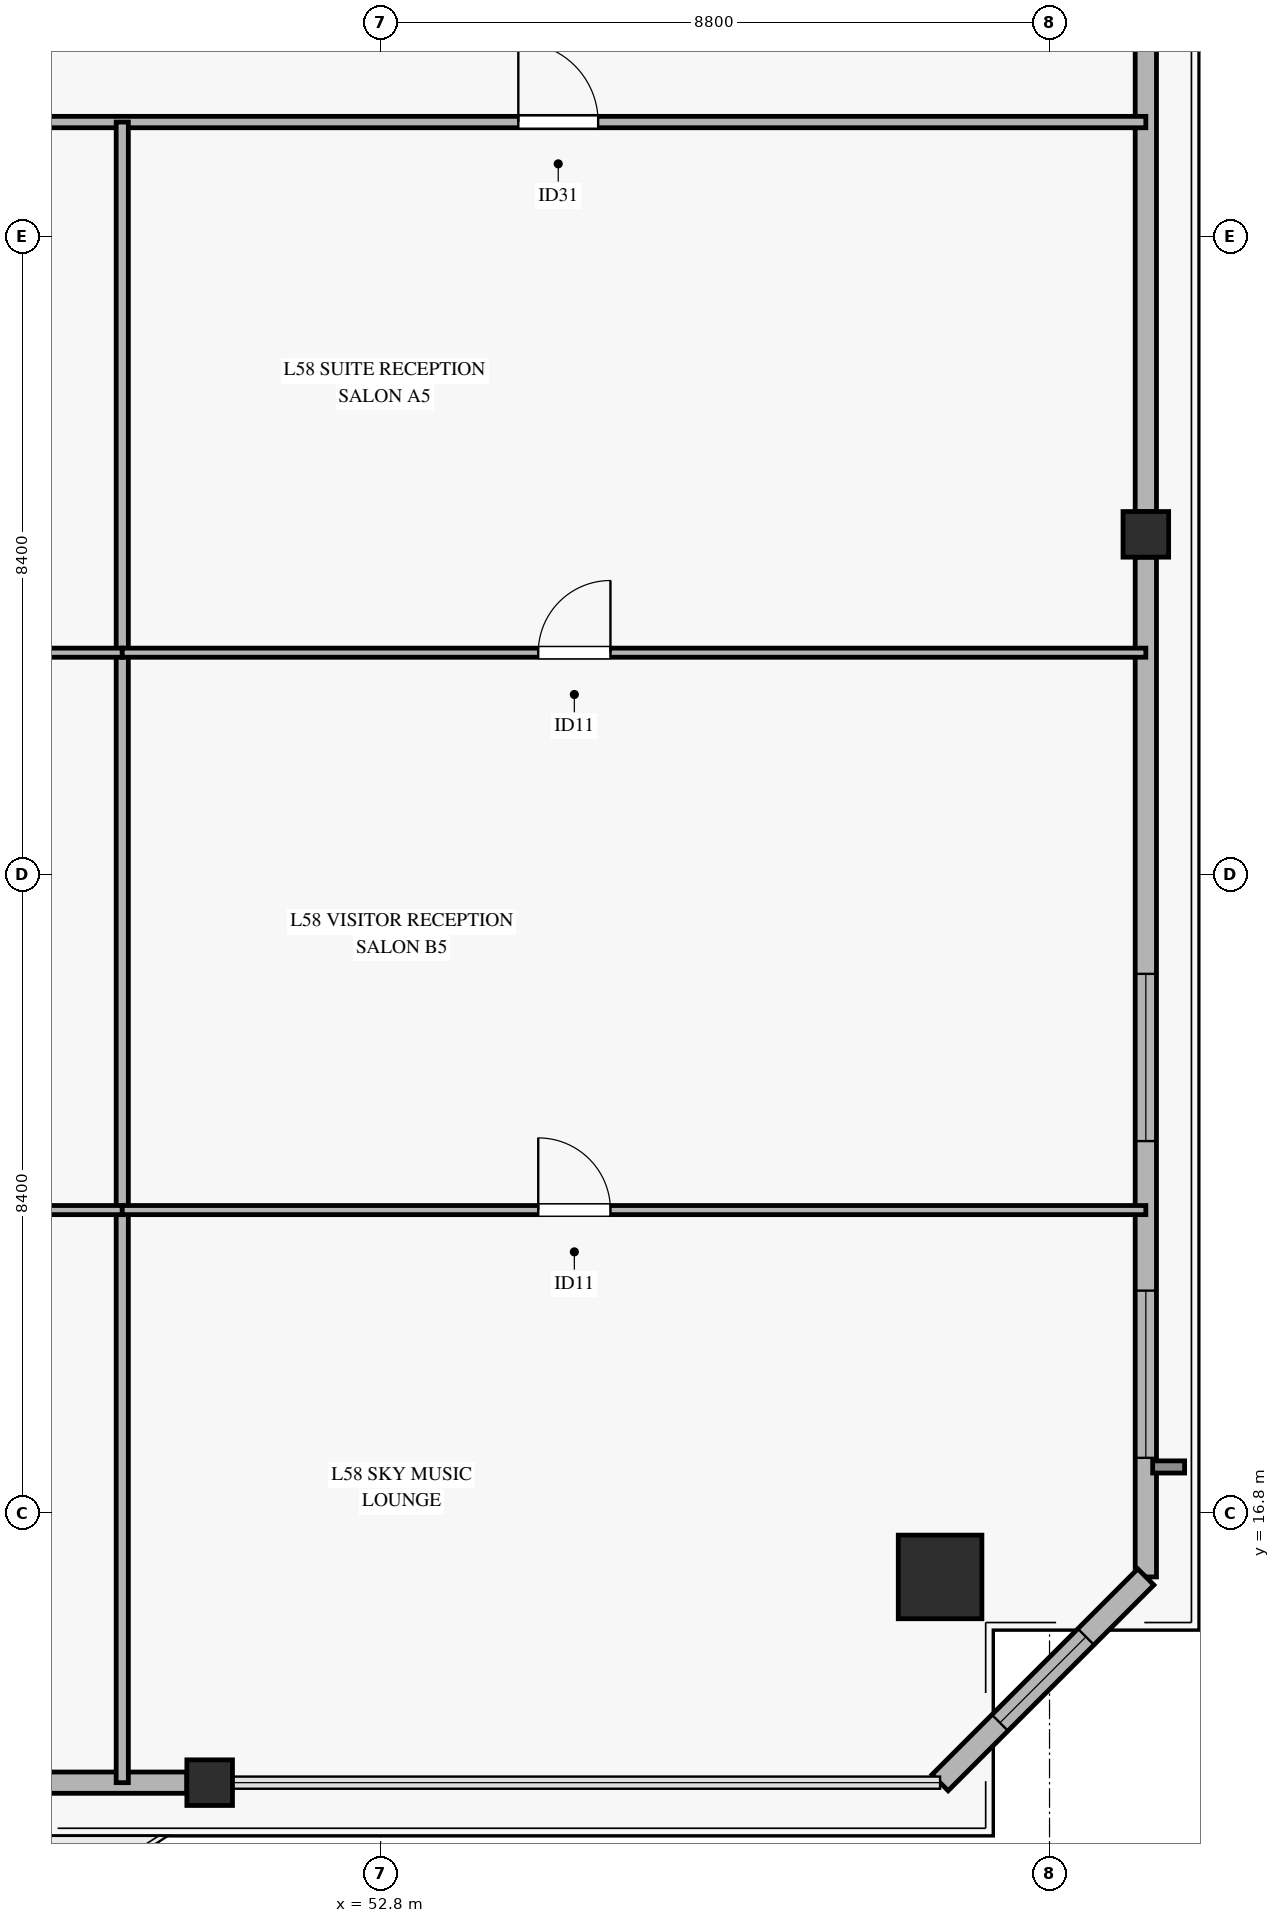
"""IFC4 building model, lengths in metres.
Left out: names, types, materials, properties, quantities, classifications, styles, units other than length and angle.
Written with IfcOpenShell. Run it as: python <this file> out.ifc"""

import sys

from ifc_helpers import new_model, si_unit, direction, frame, frame_2d, origin, origin_2d, place, context, subcontext, project, spatial, rectangle, hollow_rectangle, extrude, source, transform, mapped, element, fill, save


model = new_model("IFC4")
c1 = context("Model", 3, precision=1e-05, world=origin(), true_north=direction((0.0, 1.0)))
c2 = subcontext(c1, "Body", "Model", "MODEL_VIEW")
j1 = project(units=[si_unit("LENGTHUNIT", "METRE"), si_unit("PLANEANGLEUNIT", "RADIAN")], contexts=[c1])
p1 = place(None, origin())
s1 = spatial("IfcSite", under=j1, at=p1, CompositionType="ELEMENT")
p2 = place(p1, origin())
s2 = spatial("IfcBuilding", under=s1, at=p2, CompositionType="ELEMENT")
p3 = place(p2, frame((0.0, 0.0, 230.4)))
s3 = spatial("IfcBuildingStorey", under=s2, at=p3, CompositionType="ELEMENT", Elevation=230.4)
m1 = source(origin(), c2, "Body", "SweptSolid", [
    extrude(hollow_rectangle(XDim=1.1, YDim=1.1, WallThickness=0.05, at=origin_2d()), origin(), (0.0, 0.0, 1.0), 3.185),
])
p4 = place(p3, frame((60.16, 15.957, 0.0), z_axis=(0.0, 0.0, 1.0), x_axis=(1.0, 0.0, 0.0)))
e1 = element("IfcColumn", 1, at=p4, inside=s3, PredefinedType="COLUMN", context=c2, shape_type="MappedRepresentation", body=[
    mapped(m1, transform((0.0, 0.0, 0.0), x_axis=(1.0, 0.0, 0.0), y_axis=(0.0, 1.0, 0.0), z_axis=(0.0, 0.0, 1.0), scale=1.0)),
])
m2 = source(origin(), c2, "Body", "SweptSolid", [
    extrude(hollow_rectangle(XDim=0.6, YDim=0.6, WallThickness=0.028, at=origin_2d()), origin(), (0.0, 0.0, 1.0), 3.185),
])
for number, where, z_axis, x_axis in (
    (2, (50.55, 13.25, 0.0), (0.0, 0.0, 1.0), (1.0, 0.0, 0.0)),
    (3, (62.867, 29.675, 0.0), (0.0, 0.0, 1.0), (1.0, 0.0, 0.0)),
):
    element("IfcColumn", number, at=place(p3, frame(where, z_axis=z_axis, x_axis=x_axis)), inside=s3, PredefinedType="COLUMN", context=c2, shape_type="MappedRepresentation", body=[
        mapped(m2, transform((0.0, 0.0, 0.0), x_axis=(1.0, 0.0, 0.0), y_axis=(0.0, 1.0, 0.0), z_axis=(0.0, 0.0, 1.0), scale=1.0)),
    ])
p5 = place(p3, frame((44.6, 13.25, 0.0), z_axis=(0.0, 0.0, 1.0), x_axis=(1.0, 0.0, 0.0)))
e4 = element("IfcWall", 4, at=p5, inside=s3, PredefinedType="SOLIDWALL", context=c2, shape_type="SweptSolid", body=[
    extrude(rectangle(XDim=5.65, YDim=0.28, at=frame_2d((2.825, 0.0))), origin(), (0.0, 0.0, 1.0), 2.815),
])
p6 = place(p5, frame((1.9, 0.0, 0.0)))
e5 = element("IfcOpeningElement", 5, at=p6, cuts=e4, PredefinedType="OPENING", context=c2, shape_type="SweptSolid", body=[
    extrude(rectangle(XDim=1.8, YDim=2.25, at=frame_2d((0.9, 1.125))), frame((0.0, 0.15, 0.0), z_axis=(0.0, -1.0, 0.0), x_axis=(1.0, 0.0, 0.0)), (0.0, 0.0, 1.0), 0.3),
])
p7 = place(p3, frame((62.867, 15.957, 0.0), z_axis=(0.0, 0.0, 1.0), x_axis=(0.0, 1.0, 0.0)))
e6 = element("IfcWall", 6, at=p7, inside=s3, PredefinedType="SOLIDWALL", context=c2, shape_type="SweptSolid", body=[
    extrude(rectangle(XDim=13.418, YDim=0.28, at=frame_2d((6.709, 0.0))), origin(), (0.0, 0.0, 1.0), 2.815),
])
p8 = place(p7, frame((1.567, 0.0, 0.45)))
e7 = element("IfcOpeningElement", 7, at=p8, cuts=e6, PredefinedType="OPENING", context=c2, shape_type="SweptSolid", body=[
    extrude(rectangle(XDim=2.2, YDim=2.1, at=frame_2d((1.1, 1.05))), frame((0.0, 0.15, 0.0), z_axis=(0.0, -1.0, 0.0), x_axis=(1.0, 0.0, 0.0)), (0.0, 0.0, 1.0), 0.3),
])
p9 = place(p7, frame((5.735, 0.0, 0.45)))
e8 = element("IfcOpeningElement", 8, at=p9, cuts=e6, PredefinedType="OPENING", context=c2, shape_type="SweptSolid", body=[
    extrude(rectangle(XDim=2.2, YDim=2.1, at=frame_2d((1.1, 1.05))), frame((0.0, 0.15, 0.0), z_axis=(0.0, -1.0, 0.0), x_axis=(1.0, 0.0, 0.0)), (0.0, 0.0, 1.0), 0.3),
])
p10 = place(p3, frame((62.867, 29.975, 0.0), z_axis=(0.0, 0.0, 1.0), x_axis=(0.0, 1.0, 0.0)))
e9 = element("IfcWall", 9, at=p10, inside=s3, PredefinedType="SOLIDWALL", context=c2, shape_type="SweptSolid", body=[
    extrude(rectangle(XDim=13.418, YDim=0.28, at=frame_2d((6.709, 0.0))), origin(), (0.0, 0.0, 1.0), 2.815),
])
p11 = place(p10, frame((8.093, 0.0, 0.45)))
e10 = element("IfcOpeningElement", 10, at=p11, cuts=e9, PredefinedType="OPENING", context=c2, shape_type="SweptSolid", body=[
    extrude(rectangle(XDim=2.2, YDim=2.1, at=frame_2d((1.1, 1.05))), frame((0.0, 0.15, 0.0), z_axis=(0.0, -1.0, 0.0), x_axis=(1.0, 0.0, 0.0)), (0.0, 0.0, 1.0), 0.3),
])
p12 = place(p3, frame((60.16, 13.25, 0.0), z_axis=(0.0, 0.0, 1.0), x_axis=(0.707106781187, 0.707106781187, 0.0)))
e11 = element("IfcWall", 11, at=p12, inside=s3, PredefinedType="SOLIDWALL", context=c2, shape_type="SweptSolid", body=[
    extrude(rectangle(XDim=3.828, YDim=0.3, at=frame_2d((1.914, 0.0))), origin(), (0.0, 0.0, 1.0), 2.815),
])
p13 = place(p12, frame((1.114, 0.0, 0.45)))
e12 = element("IfcOpeningElement", 12, at=p13, cuts=e11, PredefinedType="OPENING", context=c2, shape_type="SweptSolid", body=[
    extrude(rectangle(XDim=1.6, YDim=2.0, at=frame_2d((0.8, 1.0))), frame((0.0, 0.16, 0.0), z_axis=(0.0, -1.0, 0.0), x_axis=(1.0, 0.0, 0.0)), (0.0, 0.0, 1.0), 0.32),
])
p14 = place(p3, frame((7.533, 35.1, 0.0), z_axis=(0.0, 0.0, 1.0), x_axis=(1.0, 0.0, 0.0)))
e13 = element("IfcWall", 13, at=p14, inside=s3, PredefinedType="PARTITIONING", context=c2, shape_type="SweptSolid", body=[
    extrude(rectangle(XDim=55.334, YDim=0.15, at=frame_2d((27.667, 0.0))), origin(), (0.0, 0.0, 1.0), 2.37),
])
p15 = place(p14, frame((5.335, 0.0, 0.0)))
e14 = element("IfcOpeningElement", 14, at=p15, cuts=e13, PredefinedType="OPENING", context=c2, shape_type="SweptSolid", body=[
    extrude(rectangle(XDim=1.05, YDim=2.15, at=frame_2d((0.525, 1.075))), frame((0.0, 0.085, 0.0), z_axis=(0.0, -1.0, 0.0), x_axis=(1.0, 0.0, 0.0)), (0.0, 0.0, 1.0), 0.17),
])
p16 = place(p14, frame((17.207, 0.0, 0.0)))
e15 = element("IfcOpeningElement", 15, at=p16, cuts=e13, PredefinedType="OPENING", context=c2, shape_type="SweptSolid", body=[
    extrude(rectangle(XDim=1.05, YDim=2.15, at=frame_2d((0.525, 1.075))), frame((0.0, 0.085, 0.0), z_axis=(0.0, -1.0, 0.0), x_axis=(1.0, 0.0, 0.0)), (0.0, 0.0, 1.0), 0.17),
])
p17 = place(p14, frame((25.884, 0.0, 0.0)))
e16 = element("IfcOpeningElement", 16, at=p17, cuts=e13, PredefinedType="OPENING", context=c2, shape_type="SweptSolid", body=[
    extrude(rectangle(XDim=1.05, YDim=2.15, at=frame_2d((0.525, 1.075))), frame((0.0, 0.085, 0.0), z_axis=(0.0, -1.0, 0.0), x_axis=(1.0, 0.0, 0.0)), (0.0, 0.0, 1.0), 0.17),
])
p18 = place(p14, frame((35.712, 0.0, 0.0)))
e17 = element("IfcOpeningElement", 17, at=p18, cuts=e13, PredefinedType="OPENING", context=c2, shape_type="SweptSolid", body=[
    extrude(rectangle(XDim=1.05, YDim=2.15, at=frame_2d((0.525, 1.075))), frame((0.0, 0.085, 0.0), z_axis=(0.0, -1.0, 0.0), x_axis=(1.0, 0.0, 0.0)), (0.0, 0.0, 1.0), 0.17),
])
p19 = place(p14, frame((47.078, 0.0, 0.0)))
e18 = element("IfcOpeningElement", 18, at=p19, cuts=e13, PredefinedType="OPENING", context=c2, shape_type="SweptSolid", body=[
    extrude(rectangle(XDim=1.05, YDim=2.15, at=frame_2d((0.525, 1.075))), frame((0.0, 0.085, 0.0), z_axis=(0.0, -1.0, 0.0), x_axis=(1.0, 0.0, 0.0)), (0.0, 0.0, 1.0), 0.17),
])
p20 = place(p3, frame((49.4, 13.25, 0.0), z_axis=(0.0, 0.0, 1.0), x_axis=(0.0, 1.0, 0.0)))
e19 = element("IfcWall", 19, at=p20, inside=s3, PredefinedType="PARTITIONING", context=c2, shape_type="SweptSolid", body=[
    extrude(rectangle(XDim=21.85, YDim=0.16, at=frame_2d((10.925, 0.0))), origin(), (0.0, 0.0, 1.0), 2.77),
])
p21 = place(p3, frame((39.2, 20.784, 0.0), z_axis=(0.0, 0.0, 1.0), x_axis=(1.0, 0.0, 0.0)))
e20 = element("IfcWall", 20, at=p21, inside=s3, PredefinedType="PARTITIONING", context=c2, shape_type="SweptSolid", body=[
    extrude(rectangle(XDim=10.2, YDim=0.12, at=frame_2d((5.1, 0.0))), origin(), (0.0, 0.0, 1.0), 2.37),
])
p22 = place(p21, frame((4.246, 0.0, 0.0)))
e21 = element("IfcOpeningElement", 21, at=p22, cuts=e20, PredefinedType="OPENING", context=c2, shape_type="SweptSolid", body=[
    extrude(rectangle(XDim=0.95, YDim=2.1, at=frame_2d((0.475, 1.05))), frame((0.0, 0.07, 0.0), z_axis=(0.0, -1.0, 0.0), x_axis=(1.0, 0.0, 0.0)), (0.0, 0.0, 1.0), 0.14),
])
p23 = place(p3, frame((39.2, 28.118, 0.0), z_axis=(0.0, 0.0, 1.0), x_axis=(1.0, 0.0, 0.0)))
e22 = element("IfcWall", 22, at=p23, inside=s3, PredefinedType="PARTITIONING", context=c2, shape_type="SweptSolid", body=[
    extrude(rectangle(XDim=10.2, YDim=0.12, at=frame_2d((5.1, 0.0))), origin(), (0.0, 0.0, 1.0), 2.37),
])
p24 = place(p23, frame((4.246, 0.0, 0.0)))
e23 = element("IfcOpeningElement", 23, at=p24, cuts=e22, PredefinedType="OPENING", context=c2, shape_type="SweptSolid", body=[
    extrude(rectangle(XDim=0.95, YDim=2.1, at=frame_2d((0.475, 1.05))), frame((0.0, 0.07, 0.0), z_axis=(0.0, -1.0, 0.0), x_axis=(1.0, 0.0, 0.0)), (0.0, 0.0, 1.0), 0.14),
])
p25 = place(p3, frame((49.4, 20.784, 0.0), z_axis=(0.0, 0.0, 1.0), x_axis=(1.0, 0.0, 0.0)))
e24 = element("IfcWall", 24, at=p25, inside=s3, PredefinedType="PARTITIONING", context=c2, shape_type="SweptSolid", body=[
    extrude(rectangle(XDim=13.467, YDim=0.12, at=frame_2d((6.733, 0.0))), origin(), (0.0, 0.0, 1.0), 2.37),
])
p26 = place(p25, frame((5.473, 0.0, 0.0)))
e25 = element("IfcOpeningElement", 25, at=p26, cuts=e24, PredefinedType="OPENING", context=c2, shape_type="SweptSolid", body=[
    extrude(rectangle(XDim=0.95, YDim=2.1, at=frame_2d((0.475, 1.05))), frame((0.0, 0.07, 0.0), z_axis=(0.0, -1.0, 0.0), x_axis=(1.0, 0.0, 0.0)), (0.0, 0.0, 1.0), 0.14),
])
p27 = place(p3, frame((49.4, 28.118, 0.0), z_axis=(0.0, 0.0, 1.0), x_axis=(1.0, 0.0, 0.0)))
e26 = element("IfcWall", 26, at=p27, inside=s3, PredefinedType="PARTITIONING", context=c2, shape_type="SweptSolid", body=[
    extrude(rectangle(XDim=13.467, YDim=0.12, at=frame_2d((6.733, 0.0))), origin(), (0.0, 0.0, 1.0), 2.37),
])
p28 = place(p27, frame((5.473, 0.0, 0.0)))
e27 = element("IfcOpeningElement", 27, at=p28, cuts=e26, PredefinedType="OPENING", context=c2, shape_type="SweptSolid", body=[
    extrude(rectangle(XDim=0.95, YDim=2.1, at=frame_2d((0.475, 1.05))), frame((0.0, 0.07, 0.0), z_axis=(0.0, -1.0, 0.0), x_axis=(1.0, 0.0, 0.0)), (0.0, 0.0, 1.0), 0.14),
])
m3 = source(origin(), c2, "Body", "SweptSolid", [
    extrude(rectangle(XDim=2.2, YDim=2.1, at=frame_2d((1.1, 1.05))), frame((0.0, 0.03, 0.0), z_axis=(0.0, -1.0, 0.0), x_axis=(1.0, 0.0, 0.0)), (0.0, 0.0, 1.0), 0.06),
])
p29 = place(p8, origin())
e28 = element("IfcWindow", 28, at=p29, inside=s3, PartitioningType="SINGLE_PANEL", PredefinedType="WINDOW", context=c2, shape_type="MappedRepresentation", body=[
    mapped(m3, transform((0.0, 0.0, 0.0), x_axis=(1.0, 0.0, 0.0), y_axis=(0.0, 1.0, 0.0), z_axis=(0.0, 0.0, 1.0), scale=1.0)),
])
fill(e7, e28)
p30 = place(p9, origin())
e29 = element("IfcWindow", 29, at=p30, inside=s3, PartitioningType="SINGLE_PANEL", PredefinedType="WINDOW", context=c2, shape_type="MappedRepresentation", body=[
    mapped(m3, transform((0.0, 0.0, 0.0), x_axis=(1.0, 0.0, 0.0), y_axis=(0.0, 1.0, 0.0), z_axis=(0.0, 0.0, 1.0), scale=1.0)),
])
fill(e8, e29)
m4 = source(origin(), c2, "Body", "SweptSolid", [
    extrude(rectangle(XDim=1.6, YDim=2.0, at=frame_2d((0.8, 1.0))), frame((0.0, 0.03, 0.0), z_axis=(0.0, -1.0, 0.0), x_axis=(1.0, 0.0, 0.0)), (0.0, 0.0, 1.0), 0.06),
])
p31 = place(p13, origin())
e30 = element("IfcWindow", 30, at=p31, inside=s3, PartitioningType="SINGLE_PANEL", PredefinedType="WINDOW", context=c2, shape_type="MappedRepresentation", body=[
    mapped(m4, transform((0.0, 0.0, 0.0), x_axis=(1.0, 0.0, 0.0), y_axis=(0.0, 1.0, 0.0), z_axis=(0.0, 0.0, 1.0), scale=1.0)),
])
fill(e12, e30)
m5 = source(origin(), c2, "Body", "SweptSolid", [
    extrude(rectangle(XDim=1.05, YDim=2.15, at=frame_2d((0.525, 1.075))), frame((0.0, 0.025, 0.0), z_axis=(0.0, -1.0, 0.0), x_axis=(1.0, 0.0, 0.0)), (0.0, 0.0, 1.0), 0.05),
])
p32 = place(p19, origin())
e31 = element("IfcDoor", 31, at=p32, inside=s3, OperationType="SINGLE_SWING_LEFT", PredefinedType="DOOR", context=c2, shape_type="MappedRepresentation", body=[
    mapped(m5, transform((0.0, 0.0, 0.0), x_axis=(1.0, 0.0, 0.0), y_axis=(0.0, 1.0, 0.0), z_axis=(0.0, 0.0, 1.0), scale=1.0)),
])
fill(e18, e31)
m6 = source(origin(), c2, "Body", "SweptSolid", [
    extrude(rectangle(XDim=0.95, YDim=2.1, at=frame_2d((0.475, 1.05))), frame((0.0, 0.025, 0.0), z_axis=(0.0, -1.0, 0.0), x_axis=(1.0, 0.0, 0.0)), (0.0, 0.0, 1.0), 0.05),
])
p33 = place(p28, origin())
e32 = element("IfcDoor", 32, at=p33, inside=s3, OperationType="SINGLE_SWING_RIGHT", PredefinedType="DOOR", context=c2, shape_type="MappedRepresentation", body=[
    mapped(m6, transform((0.0, 0.0, 0.0), x_axis=(1.0, 0.0, 0.0), y_axis=(0.0, 1.0, 0.0), z_axis=(0.0, 0.0, 1.0), scale=1.0)),
])
fill(e27, e32)
p34 = place(p26, origin())
e33 = element("IfcDoor", 33, at=p34, inside=s3, OperationType="SINGLE_SWING_LEFT", PredefinedType="DOOR", context=c2, shape_type="MappedRepresentation", body=[
    mapped(m6, transform((0.0, 0.0, 0.0), x_axis=(1.0, 0.0, 0.0), y_axis=(0.0, 1.0, 0.0), z_axis=(0.0, 0.0, 1.0), scale=1.0)),
])
fill(e25, e33)
save(model, sys.argv[1])
